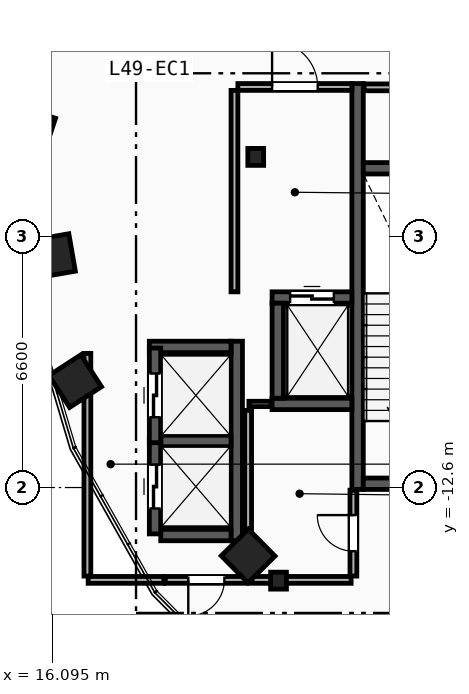
"""IFC4 building model, lengths in metres.
Left out: names, types, materials, properties, quantities, classifications, styles, units other than length and angle.
Written with IfcOpenShell. Run it as: python <this file> out.ifc"""

import sys

from ifc_helpers import new_model, si_unit, direction, frame, frame_2d, origin, origin_2d, place, context, subcontext, project, spatial, rectangle, i_section, extrude, element, fill, save


model = new_model("IFC4")
c1 = context("Model", 3, precision=1e-05, world=origin(), true_north=direction((0.0, 1.0)))
c2 = subcontext(c1, "Body", "Model", "MODEL_VIEW")
j1 = project(units=[si_unit("LENGTHUNIT", "METRE"), si_unit("PLANEANGLEUNIT", "RADIAN")], contexts=[c1])
p1 = place(None, origin())
s1 = spatial("IfcSite", under=j1, at=p1, CompositionType="ELEMENT")
p2 = place(p1, origin())
s2 = spatial("IfcBuilding", under=s1, at=p2, CompositionType="ELEMENT")
p3 = place(p2, frame((0.0, 0.0, 187.2)))
s3 = spatial("IfcBuildingStorey", under=s2, at=p3, CompositionType="ELEMENT", Elevation=187.2)
for number, where, z_axis, x_axis in (
    (1, (21.45, -3.9, 0.0), (0.0, 0.0, 1.0), (1.0, 0.0, 0.0)),
    (2, (22.05, -15.05, 0.0), (0.0, 0.0, 1.0), (1.0, 0.0, 0.0)),
):
    element("IfcColumn", number, at=place(p3, frame(where, z_axis=z_axis, x_axis=x_axis)), inside=s3, PredefinedType="COLUMN", context=c2, shape_type="SweptSolid", body=[
        extrude(i_section(OverallWidth=0.416, OverallDepth=0.446, WebThickness=0.039, FlangeThickness=0.063, FilletRadius=0.018, at=origin_2d()), origin(), (0.0, 0.0, 1.0), 4.6),
    ])
for number, where, z_axis, x_axis in (
    (3, (15.55, -3.2, 0.0), (0.0, 0.0, 1.0), (-0.315, -0.949, 0.0)),
    (4, (16.125, -6.5, 0.0), (0.0, 0.0, 1.0), (0.172, -0.985, 0.0)),
    (5, (16.7, -9.8, 0.0), (0.0, 0.0, 1.0), (0.544, -0.839, 0.0)),
    (6, (21.25, -14.4, 0.0), (0.0, 0.0, 1.0), (0.703, -0.711, 0.0)),
):
    element("IfcColumn", number, at=place(p3, frame(where, z_axis=z_axis, x_axis=x_axis)), inside=s3, PredefinedType="COLUMN", context=c2, shape_type="SweptSolid", body=[
        extrude(rectangle(XDim=1.0, YDim=1.0, at=origin_2d()), origin(), (0.0, 0.0, 1.0), 4.6),
    ])
p4 = place(p3, frame((24.13, -12.65, 0.0), z_axis=(0.0, 0.0, 1.0), x_axis=(0.0, 1.0, 0.0)))
e7 = element("IfcWall", 7, at=p4, inside=s3, PredefinedType="SHEAR", context=c2, shape_type="SweptSolid", body=[
    extrude(rectangle(XDim=10.68, YDim=0.3, at=frame_2d((5.34, 0.0))), origin(), (0.0, 0.0, 1.0), 4.34),
])
p5 = place(p3, frame((24.28, -12.5, 0.0), z_axis=(0.0, 0.0, 1.0), x_axis=(1.0, 0.0, 0.0)))
e8 = element("IfcWall", 8, at=p5, inside=s3, PredefinedType="SHEAR", context=c2, shape_type="SweptSolid", body=[
    extrude(rectangle(XDim=3.16, YDim=0.3, at=frame_2d((1.58, 0.0))), origin(), (0.0, 0.0, 1.0), 4.34),
])
p6 = place(p5, frame((1.03, 0.0, 0.0)))
e9 = element("IfcOpeningElement", 9, at=p6, cuts=e8, PredefinedType="OPENING", context=c2, shape_type="SweptSolid", body=[
    extrude(rectangle(XDim=1.1, YDim=2.15, at=frame_2d((0.55, 1.075))), frame((0.0, 0.16, 0.0), z_axis=(0.0, -1.0, 0.0), x_axis=(1.0, 0.0, 0.0)), (0.0, 0.0, 1.0), 0.32),
])
p7 = place(p3, frame((24.28, -4.2, 0.0), z_axis=(0.0, 0.0, 1.0), x_axis=(1.0, 0.0, 0.0)))
e10 = element("IfcWall", 10, at=p7, inside=s3, PredefinedType="SHEAR", context=c2, shape_type="SweptSolid", body=[
    extrude(rectangle(XDim=3.16, YDim=0.3, at=frame_2d((1.58, 0.0))), origin(), (0.0, 0.0, 1.0), 4.34),
])
p8 = place(p3, frame((20.89, -7.45, 0.0), z_axis=(0.0, 0.0, 1.0), x_axis=(0.0, 1.0, 0.0)))
e11 = element("IfcWall", 11, at=p8, inside=s3, PredefinedType="PARTITIONING", context=c2, shape_type="SweptSolid", body=[
    extrude(rectangle(XDim=5.3, YDim=0.18, at=frame_2d((2.65, 0.0))), origin(), (0.0, 0.0, 1.0), 4.34),
])
p9 = place(p3, frame((20.98, -2.06, 0.0), z_axis=(0.0, 0.0, 1.0), x_axis=(1.0, 0.0, 0.0)))
e12 = element("IfcWall", 12, at=p9, inside=s3, PredefinedType="PARTITIONING", context=c2, shape_type="SweptSolid", body=[
    extrude(rectangle(XDim=3.0, YDim=0.18, at=frame_2d((1.5, 0.0))), origin(), (0.0, 0.0, 1.0), 4.34),
])
p10 = place(p9, frame((0.9, 0.0, 0.0)))
e13 = element("IfcOpeningElement", 13, at=p10, cuts=e12, PredefinedType="OPENING", context=c2, shape_type="SweptSolid", body=[
    extrude(rectangle(XDim=1.2, YDim=2.15, at=frame_2d((0.6, 1.075))), frame((0.0, 0.1, 0.0), z_axis=(0.0, -1.0, 0.0), x_axis=(1.0, 0.0, 0.0)), (0.0, 0.0, 1.0), 0.2),
])
p11 = place(p3, frame((21.88, -7.6, 0.0), z_axis=(0.0, 0.0, 1.0), x_axis=(1.0, 0.0, 0.0)))
e14 = element("IfcWall", 14, at=p11, inside=s3, PredefinedType="SHEAR", context=c2, shape_type="SweptSolid", body=[
    extrude(rectangle(XDim=2.1, YDim=0.3, at=frame_2d((1.05, 0.0))), origin(), (0.0, 0.0, 1.0), 4.34),
])
p12 = place(p11, frame((0.475, 0.0, 0.0)))
e15 = element("IfcOpeningElement", 15, at=p12, cuts=e14, PredefinedType="OPENING", context=c2, shape_type="SweptSolid", body=[
    extrude(rectangle(XDim=1.15, YDim=2.2, at=frame_2d((0.575, 1.1))), frame((0.0, 0.16, 0.0), z_axis=(0.0, -1.0, 0.0), x_axis=(1.0, 0.0, 0.0)), (0.0, 0.0, 1.0), 0.32),
])
p13 = place(p3, frame((21.88, -10.4, 0.0), z_axis=(0.0, 0.0, 1.0), x_axis=(1.0, 0.0, 0.0)))
e16 = element("IfcWall", 16, at=p13, inside=s3, PredefinedType="SHEAR", context=c2, shape_type="SweptSolid", body=[
    extrude(rectangle(XDim=2.1, YDim=0.3, at=frame_2d((1.05, 0.0))), origin(), (0.0, 0.0, 1.0), 4.34),
])
p14 = place(p3, frame((22.03, -10.25, 0.0), z_axis=(0.0, 0.0, 1.0), x_axis=(0.0, 1.0, 0.0)))
e17 = element("IfcWall", 17, at=p14, inside=s3, PredefinedType="SHEAR", context=c2, shape_type="SweptSolid", body=[
    extrude(rectangle(XDim=2.5, YDim=0.3, at=frame_2d((1.25, 0.0))), origin(), (0.0, 0.0, 1.0), 4.34),
])
p15 = place(p3, frame((20.95, -14.0, 0.0), z_axis=(0.0, 0.0, 1.0), x_axis=(0.0, 1.0, 0.0)))
e18 = element("IfcWall", 18, at=p15, inside=s3, PredefinedType="SHEAR", context=c2, shape_type="SweptSolid", body=[
    extrude(rectangle(XDim=5.25, YDim=0.3, at=frame_2d((2.625, 0.0))), origin(), (0.0, 0.0, 1.0), 4.34),
])
p16 = place(p3, frame((18.95, -13.85, 0.0), z_axis=(0.0, 0.0, 1.0), x_axis=(1.0, 0.0, 0.0)))
e19 = element("IfcWall", 19, at=p16, inside=s3, PredefinedType="SHEAR", context=c2, shape_type="SweptSolid", body=[
    extrude(rectangle(XDim=1.85, YDim=0.3, at=frame_2d((0.925, 0.0))), origin(), (0.0, 0.0, 1.0), 4.34),
])
p17 = place(p3, frame((18.65, -8.9, 0.0), z_axis=(0.0, 0.0, 1.0), x_axis=(1.0, 0.0, 0.0)))
e20 = element("IfcWall", 20, at=p17, inside=s3, PredefinedType="SHEAR", context=c2, shape_type="SweptSolid", body=[
    extrude(rectangle(XDim=2.15, YDim=0.3, at=frame_2d((1.075, 0.0))), origin(), (0.0, 0.0, 1.0), 4.34),
])
p18 = place(p3, frame((18.95, -11.375, 0.0), z_axis=(0.0, 0.0, 1.0), x_axis=(1.0, 0.0, 0.0)))
e21 = element("IfcWall", 21, at=p18, inside=s3, PredefinedType="SHEAR", context=c2, shape_type="SweptSolid", body=[
    extrude(rectangle(XDim=1.85, YDim=0.3, at=frame_2d((0.925, 0.0))), origin(), (0.0, 0.0, 1.0), 4.34),
])
p19 = place(p3, frame((18.8, -13.82, 0.0), z_axis=(0.0, 0.0, 1.0), x_axis=(0.0, 1.0, 0.0)))
e22 = element("IfcWall", 22, at=p19, inside=s3, PredefinedType="SHEAR", context=c2, shape_type="SweptSolid", body=[
    extrude(rectangle(XDim=2.49, YDim=0.3, at=frame_2d((1.245, 0.0))), origin(), (0.0, 0.0, 1.0), 4.34),
])
p20 = place(p19, frame((0.67, 0.0, 0.0)))
e23 = element("IfcOpeningElement", 23, at=p20, cuts=e22, PredefinedType="OPENING", context=c2, shape_type="SweptSolid", body=[
    extrude(rectangle(XDim=1.15, YDim=2.2, at=frame_2d((0.575, 1.1))), frame((0.0, 0.16, 0.0), z_axis=(0.0, -1.0, 0.0), x_axis=(1.0, 0.0, 0.0)), (0.0, 0.0, 1.0), 0.32),
])
p21 = place(p3, frame((18.8, -11.42, 0.0), z_axis=(0.0, 0.0, 1.0), x_axis=(0.0, 1.0, 0.0)))
e24 = element("IfcWall", 24, at=p21, inside=s3, PredefinedType="SHEAR", context=c2, shape_type="SweptSolid", body=[
    extrude(rectangle(XDim=2.49, YDim=0.3, at=frame_2d((1.245, 0.0))), origin(), (0.0, 0.0, 1.0), 4.34),
])
p22 = place(p21, frame((0.67, 0.0, 0.0)))
e25 = element("IfcOpeningElement", 25, at=p22, cuts=e24, PredefinedType="OPENING", context=c2, shape_type="SweptSolid", body=[
    extrude(rectangle(XDim=1.15, YDim=2.2, at=frame_2d((0.575, 1.1))), frame((0.0, 0.16, 0.0), z_axis=(0.0, -1.0, 0.0), x_axis=(1.0, 0.0, 0.0)), (0.0, 0.0, 1.0), 0.32),
])
p23 = place(p3, frame((17.02, -14.93, 0.0), z_axis=(0.0, 0.0, 1.0), x_axis=(0.0, 1.0, 0.0)))
e26 = element("IfcWall", 26, at=p23, inside=s3, PredefinedType="PARTITIONING", context=c2, shape_type="SweptSolid", body=[
    extrude(rectangle(XDim=5.86, YDim=0.18, at=frame_2d((2.93, 0.0))), origin(), (0.0, 0.0, 1.0), 4.34),
])
p24 = place(p3, frame((17.04, -15.03, 0.0), z_axis=(0.0, 0.0, 1.0), x_axis=(1.0, 0.0, 0.0)))
e27 = element("IfcWall", 27, at=p24, inside=s3, PredefinedType="PARTITIONING", context=c2, shape_type="SweptSolid", body=[
    extrude(rectangle(XDim=1.99, YDim=0.18, at=frame_2d((0.995, 0.0))), origin(), (0.0, 0.0, 1.0), 4.34),
])
p25 = place(p3, frame((21.23, -15.03, 0.0), z_axis=(0.0, 0.0, 1.0), x_axis=(-1.0, 0.0, 0.0)))
e28 = element("IfcWall", 28, at=p25, inside=s3, PredefinedType="PARTITIONING", context=c2, shape_type="SweptSolid", body=[
    extrude(rectangle(XDim=2.16, YDim=0.18, at=frame_2d((1.08, 0.0))), origin(), (0.0, 0.0, 1.0), 4.34),
])
p26 = place(p25, frame((0.605, 0.0, 0.0)))
e29 = element("IfcOpeningElement", 29, at=p26, cuts=e28, PredefinedType="OPENING", context=c2, shape_type="SweptSolid", body=[
    extrude(rectangle(XDim=0.95, YDim=2.1, at=frame_2d((0.475, 1.05))), frame((0.0, 0.1, 0.0), z_axis=(0.0, -1.0, 0.0), x_axis=(1.0, 0.0, 0.0)), (0.0, 0.0, 1.0), 0.2),
])
p27 = place(p3, frame((21.27, -10.4, 0.0), z_axis=(0.0, 0.0, 1.0), x_axis=(1.0, 0.0, 0.0)))
e30 = element("IfcWall", 30, at=p27, inside=s3, PredefinedType="PARTITIONING", context=c2, shape_type="SweptSolid", body=[
    extrude(rectangle(XDim=0.59, YDim=0.14, at=frame_2d((0.295, 0.0))), origin(), (0.0, 0.0, 1.0), 4.34),
])
p28 = place(p3, frame((21.25, -14.93, 0.0), z_axis=(0.0, 0.0, 1.0), x_axis=(0.0, 1.0, 0.0)))
e31 = element("IfcWall", 31, at=p28, inside=s3, PredefinedType="PARTITIONING", context=c2, shape_type="SweptSolid", body=[
    extrude(rectangle(XDim=4.36, YDim=0.18, at=frame_2d((2.18, 0.0))), origin(), (0.0, 0.0, 1.0), 4.34),
])
p29 = place(p3, frame((21.35, -15.03, 0.0), z_axis=(0.0, 0.0, 1.0), x_axis=(1.0, 0.0, 0.0)))
e32 = element("IfcWall", 32, at=p29, inside=s3, PredefinedType="PARTITIONING", context=c2, shape_type="SweptSolid", body=[
    extrude(rectangle(XDim=2.61, YDim=0.18, at=frame_2d((1.305, 0.0))), origin(), (0.0, 0.0, 1.0), 3.413),
])
p30 = place(p3, frame((24.3, -2.07, 0.0), z_axis=(0.0, 0.0, 1.0), x_axis=(1.0, 0.0, 0.0)))
e33 = element("IfcWall", 33, at=p30, inside=s3, PredefinedType="PARTITIONING", context=c2, shape_type="SweptSolid", body=[
    extrude(rectangle(XDim=3.12, YDim=0.18, at=frame_2d((1.56, 0.0))), origin(), (0.0, 0.0, 1.0), 4.34),
])
p31 = place(p30, frame((1.085, 0.0, 0.0)))
e34 = element("IfcOpeningElement", 34, at=p31, cuts=e33, PredefinedType="OPENING", context=c2, shape_type="SweptSolid", body=[
    extrude(rectangle(XDim=0.95, YDim=2.1, at=frame_2d((0.475, 1.05))), frame((0.0, 0.1, 0.0), z_axis=(0.0, -1.0, 0.0), x_axis=(1.0, 0.0, 0.0)), (0.0, 0.0, 1.0), 0.2),
])
p32 = place(p3, frame((24.02, -14.93, 0.0), z_axis=(0.0, 0.0, 1.0), x_axis=(0.0, 1.0, 0.0)))
e35 = element("IfcWall", 35, at=p32, inside=s3, PredefinedType="PARTITIONING", context=c2, shape_type="SweptSolid", body=[
    extrude(rectangle(XDim=2.26, YDim=0.18, at=frame_2d((1.13, 0.0))), origin(), (0.0, 0.0, 1.0), 4.34),
])
p33 = place(p32, frame((0.655, 0.0, 0.0)))
e36 = element("IfcOpeningElement", 36, at=p33, cuts=e35, PredefinedType="OPENING", context=c2, shape_type="SweptSolid", body=[
    extrude(rectangle(XDim=0.95, YDim=2.1, at=frame_2d((0.475, 1.05))), frame((0.0, 0.1, 0.0), z_axis=(0.0, -1.0, 0.0), x_axis=(1.0, 0.0, 0.0)), (0.0, 0.0, 1.0), 0.2),
])
p34 = place(p10, origin())
e37 = element("IfcDoor", 37, at=p34, inside=s3, OperationType="SINGLE_SWING_LEFT", PredefinedType="DOOR", context=c2, shape_type="SweptSolid", body=[
    extrude(rectangle(XDim=1.2, YDim=2.15, at=frame_2d((0.6, 1.075))), frame((0.0, 0.025, 0.0), z_axis=(0.0, -1.0, 0.0), x_axis=(1.0, 0.0, 0.0)), (0.0, 0.0, 1.0), 0.05),
])
fill(e13, e37)
p35 = place(p12, origin())
e38 = element("IfcDoor", 38, at=p35, inside=s3, OperationType="SLIDING_TO_LEFT", PredefinedType="TRAPDOOR", context=c2, shape_type="SweptSolid", body=[
    extrude(rectangle(XDim=1.15, YDim=2.2, at=frame_2d((0.575, 1.1))), frame((0.0, 0.025, 0.0), z_axis=(0.0, -1.0, 0.0), x_axis=(1.0, 0.0, 0.0)), (0.0, 0.0, 1.0), 0.05),
])
fill(e15, e38)
p36 = place(p20, origin())
e39 = element("IfcDoor", 39, at=p36, inside=s3, OperationType="SLIDING_TO_LEFT", PredefinedType="TRAPDOOR", context=c2, shape_type="SweptSolid", body=[
    extrude(rectangle(XDim=1.15, YDim=2.2, at=frame_2d((0.575, 1.1))), frame((0.0, 0.025, 0.0), z_axis=(0.0, -1.0, 0.0), x_axis=(1.0, 0.0, 0.0)), (0.0, 0.0, 1.0), 0.05),
])
fill(e23, e39)
p37 = place(p22, origin())
e40 = element("IfcDoor", 40, at=p37, inside=s3, OperationType="SLIDING_TO_LEFT", PredefinedType="TRAPDOOR", context=c2, shape_type="SweptSolid", body=[
    extrude(rectangle(XDim=1.15, YDim=2.2, at=frame_2d((0.575, 1.1))), frame((0.0, 0.025, 0.0), z_axis=(0.0, -1.0, 0.0), x_axis=(1.0, 0.0, 0.0)), (0.0, 0.0, 1.0), 0.05),
])
fill(e25, e40)
p38 = place(p33, origin())
e41 = element("IfcDoor", 41, at=p38, inside=s3, OperationType="SINGLE_SWING_RIGHT", PredefinedType="DOOR", context=c2, shape_type="SweptSolid", body=[
    extrude(rectangle(XDim=0.95, YDim=2.1, at=frame_2d((0.475, 1.05))), frame((0.0, 0.025, 0.0), z_axis=(0.0, -1.0, 0.0), x_axis=(1.0, 0.0, 0.0)), (0.0, 0.0, 1.0), 0.05),
])
fill(e36, e41)
p39 = place(p26, origin())
e42 = element("IfcDoor", 42, at=p39, inside=s3, OperationType="SINGLE_SWING_RIGHT", PredefinedType="DOOR", context=c2, shape_type="SweptSolid", body=[
    extrude(rectangle(XDim=0.95, YDim=2.1, at=frame_2d((0.475, 1.05))), frame((0.0, 0.025, 0.0), z_axis=(0.0, -1.0, 0.0), x_axis=(1.0, 0.0, 0.0)), (0.0, 0.0, 1.0), 0.05),
])
fill(e29, e42)
save(model, sys.argv[1])
